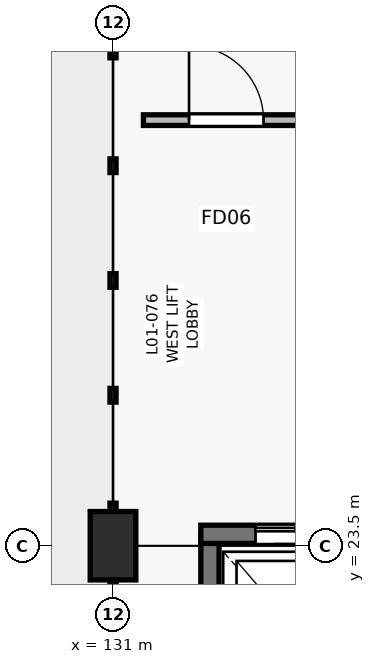
"""IFC4 building model, lengths in metres.
Left out: names, types, materials, properties, quantities, classifications, styles, units other than length and angle.
Written with IfcOpenShell. Run it as: python <this file> out.ifc"""

import sys

from ifc_helpers import new_model, si_unit, direction, frame, frame_2d, origin, origin_2d, place, context, subcontext, project, spatial, rectangle, extrude, element, fill, save


model = new_model("IFC4")
c1 = context("Model", 3, precision=1e-05, world=origin(), true_north=direction((0.0, 1.0)))
c2 = subcontext(c1, "Body", "Model", "MODEL_VIEW")
j1 = project(units=[si_unit("LENGTHUNIT", "METRE"), si_unit("PLANEANGLEUNIT", "RADIAN")], contexts=[c1])
p1 = place(None, origin())
s1 = spatial("IfcSite", under=j1, at=p1, CompositionType="ELEMENT")
p2 = place(p1, origin())
s2 = spatial("IfcBuilding", under=s1, at=p2, CompositionType="ELEMENT")
p3 = place(p2, frame((0.0, 0.0, 4.8)))
s3 = spatial("IfcBuildingStorey", under=s2, at=p3, CompositionType="ELEMENT", Elevation=4.8)
p4 = place(p3, frame((131.0, 23.5, 0.0), z_axis=(0.0, 0.0, 1.0), x_axis=(1.0, 0.0, 0.0)))
e1 = element("IfcColumn", 1, at=p4, inside=s3, PredefinedType="COLUMN", context=c2, shape_type="SweptSolid", body=[
    extrude(rectangle(XDim=0.6, YDim=0.9, at=origin_2d()), origin(), (0.0, 0.0, 1.0), 4.2),
])
p5 = place(p3, frame((132.275, 21.15, 0.0), z_axis=(0.0, 0.0, 1.0), x_axis=(0.0, 1.0, 0.0)))
e2 = element("IfcWall", 2, at=p5, inside=s3, PredefinedType="SHEAR", context=c2, shape_type="SweptSolid", body=[
    extrude(rectangle(XDim=2.5, YDim=0.24, at=frame_2d((1.25, 0.0))), origin(), (0.0, 0.0, 1.0), 8.18),
])
p6 = place(p3, frame((132.155, 23.65, 0.0), z_axis=(0.0, 0.0, 1.0), x_axis=(1.0, 0.0, 0.0)))
e3 = element("IfcWall", 3, at=p6, inside=s3, PredefinedType="SHEAR", context=c2, shape_type="SweptSolid", body=[
    extrude(rectangle(XDim=2.49, YDim=0.24, at=frame_2d((1.245, 0.0))), origin(), (0.0, 0.0, 1.0), 8.18),
])
p7 = place(p6, frame((0.72, 0.0, 0.0)))
e4 = element("IfcOpeningElement", 4, at=p7, cuts=e3, PredefinedType="OPENING", context=c2, shape_type="SweptSolid", body=[
    extrude(rectangle(XDim=1.05, YDim=2.1, at=frame_2d((0.525, 1.05))), frame((0.0, 0.13, 0.0), z_axis=(0.0, -1.0, 0.0), x_axis=(1.0, 0.0, 0.0)), (0.0, 0.0, 1.0), 0.26),
])
p8 = place(p3, frame((131.4, 29.1, 0.0), z_axis=(0.0, 0.0, 1.0), x_axis=(1.0, 0.0, 0.0)))
e5 = element("IfcWall", 5, at=p8, inside=s3, PredefinedType="PARTITIONING", context=c2, shape_type="SweptSolid", body=[
    extrude(rectangle(XDim=2.3, YDim=0.14, at=frame_2d((1.15, 0.0))), origin(), (0.0, 0.0, 1.0), 8.17),
])
p9 = place(p8, frame((0.6, 0.0, 0.0)))
e6 = element("IfcOpeningElement", 6, at=p9, cuts=e5, PredefinedType="OPENING", context=c2, shape_type="SweptSolid", body=[
    extrude(rectangle(XDim=0.98, YDim=2.1, at=frame_2d((0.49, 1.05))), frame((0.0, 0.08, 0.0), z_axis=(0.0, -1.0, 0.0), x_axis=(1.0, 0.0, 0.0)), (0.0, 0.0, 1.0), 0.16),
])
p10 = place(p7, origin())
e7 = element("IfcDoor", 7, at=p10, inside=s3, OperationType="DOUBLE_DOOR_SLIDING", PredefinedType="USERDEFINED", context=c2, shape_type="SweptSolid", body=[
    extrude(rectangle(XDim=1.05, YDim=2.1, at=frame_2d((0.525, 1.05))), frame((0.0, 0.025, 0.0), z_axis=(0.0, -1.0, 0.0), x_axis=(1.0, 0.0, 0.0)), (0.0, 0.0, 1.0), 0.05),
])
fill(e4, e7)
p11 = place(p9, origin())
e8 = element("IfcDoor", 8, at=p11, inside=s3, OperationType="SINGLE_SWING_LEFT", PredefinedType="DOOR", context=c2, shape_type="SweptSolid", body=[
    extrude(rectangle(XDim=0.98, YDim=2.1, at=frame_2d((0.49, 1.05))), frame((0.0, 0.025, 0.0), z_axis=(0.0, -1.0, 0.0), x_axis=(1.0, 0.0, 0.0)), (0.0, 0.0, 1.0), 0.05),
])
fill(e6, e8)
save(model, sys.argv[1])
